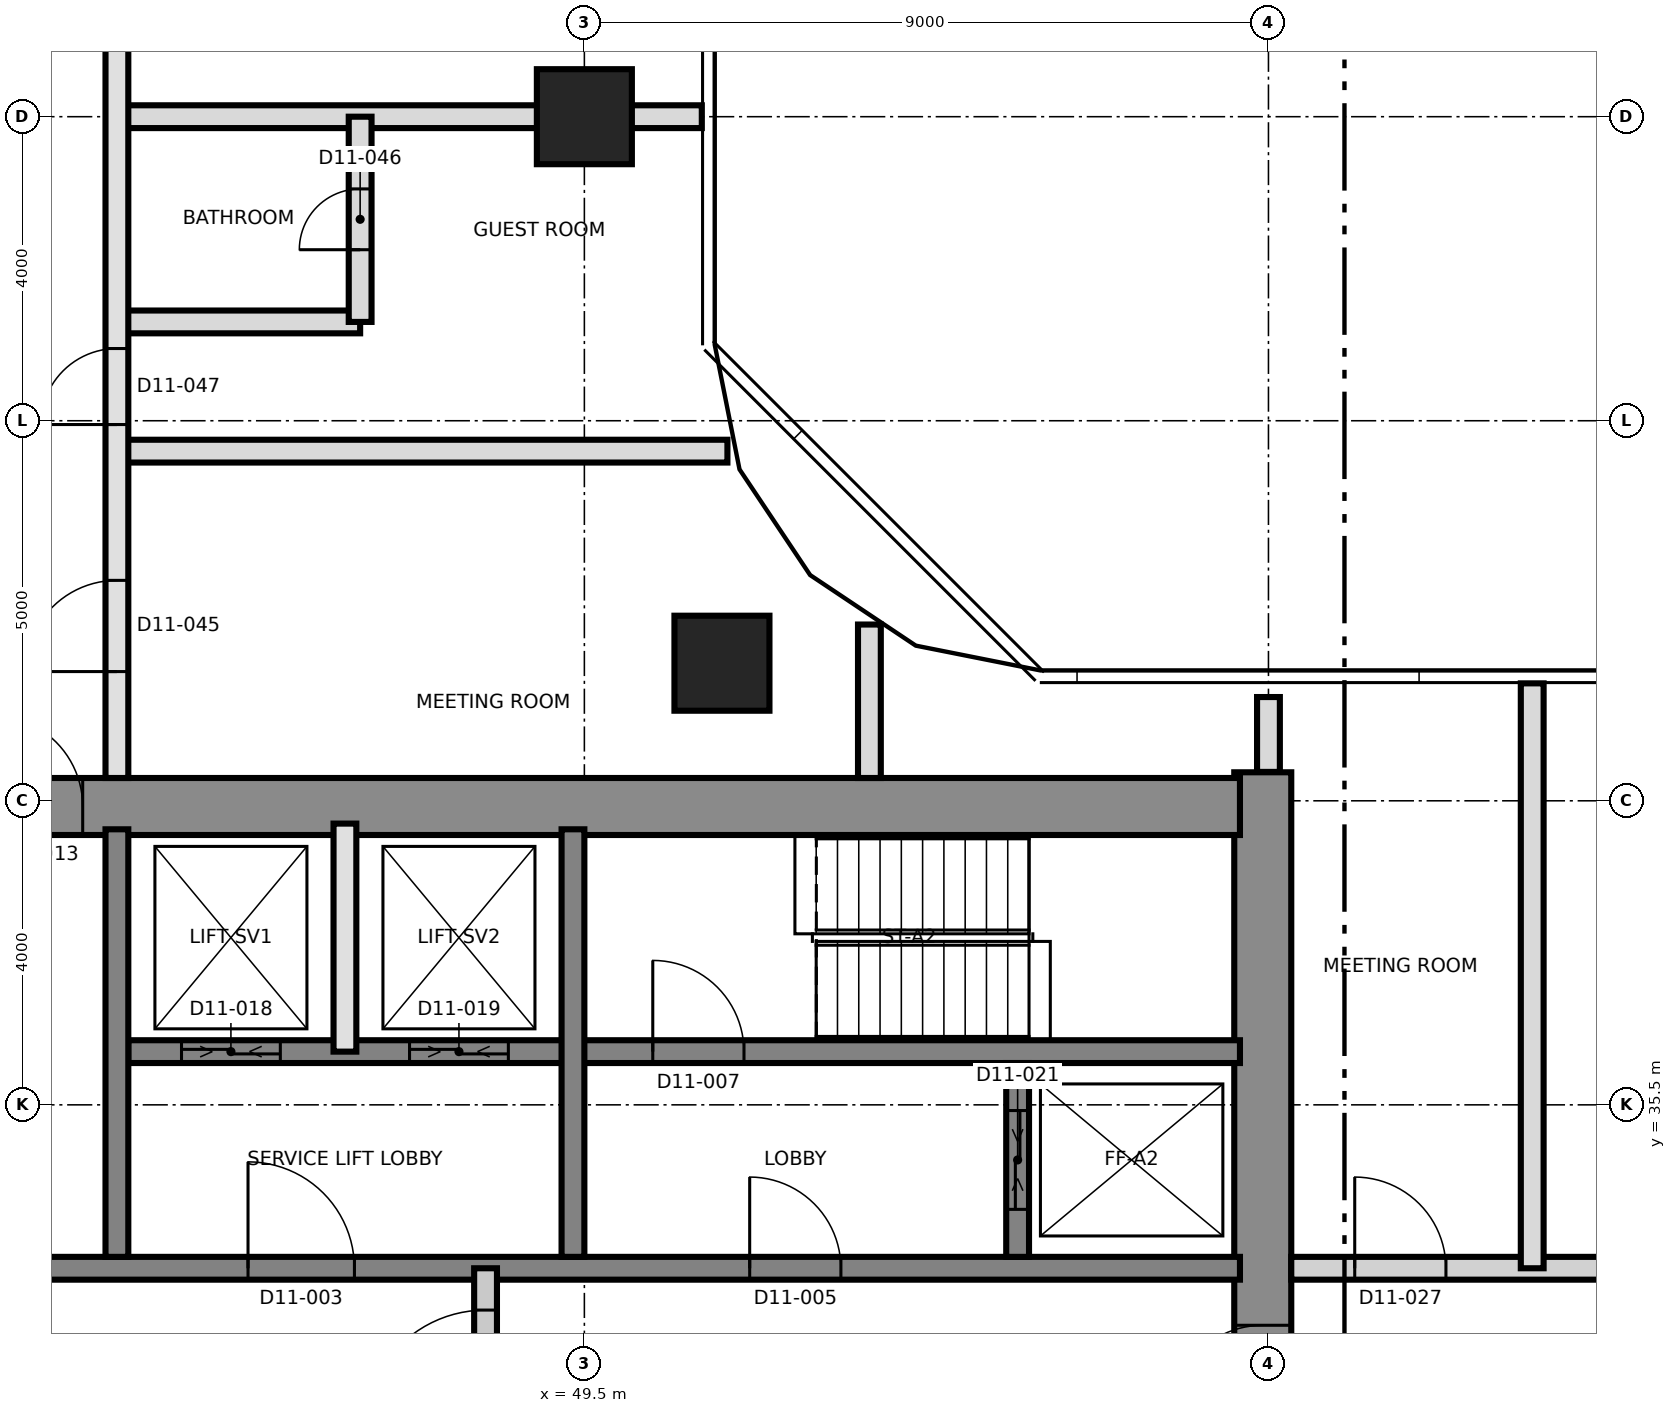
"""IFC4 building model, lengths in metres.
Left out: names, types, materials, properties, quantities, classifications, styles, units other than length and angle.
Written with IfcOpenShell. Run it as: python <this file> out.ifc"""

import sys

from ifc_helpers import new_model, si_unit, direction, frame, frame_2d, origin, origin_2d, place, context, subcontext, project, spatial, rectangle, extrude, element, fill, save


model = new_model("IFC4")
c1 = context("Model", 3, precision=1e-05, world=origin(), true_north=direction((0.0, 1.0)))
c2 = subcontext(c1, "Body", "Model", "MODEL_VIEW")
j1 = project(units=[si_unit("LENGTHUNIT", "METRE"), si_unit("PLANEANGLEUNIT", "RADIAN")], contexts=[c1])
p1 = place(None, origin())
s1 = spatial("IfcSite", under=j1, at=p1, CompositionType="ELEMENT")
p2 = place(p1, origin())
s2 = spatial("IfcBuilding", under=s1, at=p2, CompositionType="ELEMENT")
p3 = place(p2, frame((0.0, 0.0, 131.5)))
s3 = spatial("IfcBuildingStorey", under=s2, at=p3, CompositionType="ELEMENT", Elevation=131.5)
p4 = place(p3, frame((58.425, 21.125, 0.0), z_axis=(0.0, 0.0, 1.0), x_axis=(0.0, 1.0, 0.0)))
e1 = element("IfcWall", 1, at=p4, inside=s3, PredefinedType="SHEAR", context=c2, shape_type="SweptSolid", body=[
    extrude(rectangle(XDim=18.75, YDim=0.75, at=frame_2d((9.375, 0.0))), origin(), (0.0, 0.0, 1.0), 3.7),
])
p5 = place(p4, frame((10.275, 0.0, 0.0)))
e2 = element("IfcOpeningElement", 2, at=p5, cuts=e1, PredefinedType="OPENING", context=c2, shape_type="SweptSolid", body=[
    extrude(rectangle(XDim=1.2, YDim=2.1, at=frame_2d((0.6, 1.05))), frame((0.0, 0.385, 0.0), z_axis=(0.0, -1.0, 0.0), x_axis=(1.0, 0.0, 0.0)), (0.0, 0.0, 1.0), 0.77),
])
p6 = place(p3, frame((31.125, 39.425, 0.0), z_axis=(0.0, 0.0, 1.0), x_axis=(1.0, 0.0, 0.0)))
e3 = element("IfcWall", 3, at=p6, inside=s3, PredefinedType="SHEAR", context=c2, shape_type="SweptSolid", body=[
    extrude(rectangle(XDim=27.0, YDim=0.75, at=frame_2d((13.5, 0.0))), origin(), (0.0, 0.0, 1.0), 3.7),
])
p7 = place(p6, frame((10.575, 0.0, 0.0)))
e4 = element("IfcOpeningElement", 4, at=p7, cuts=e3, PredefinedType="OPENING", context=c2, shape_type="SweptSolid", body=[
    extrude(rectangle(XDim=1.2, YDim=2.1, at=frame_2d((0.6, 1.05))), frame((0.0, 0.385, 0.0), z_axis=(0.0, -1.0, 0.0), x_axis=(1.0, 0.0, 0.0)), (0.0, 0.0, 1.0), 0.77),
])
p8 = place(p3, frame((31.875, 33.35, 0.0), z_axis=(0.0, 0.0, 1.0), x_axis=(1.0, 0.0, 0.0)))
e5 = element("IfcWall", 5, at=p8, inside=s3, PredefinedType="SHEAR", context=c2, shape_type="SweptSolid", body=[
    extrude(rectangle(XDim=26.25, YDim=0.3, at=frame_2d((13.125, 0.0))), origin(), (0.0, 0.0, 1.0), 3.7),
])
p9 = place(p8, frame((13.2, 0.0, 0.0)))
e6 = element("IfcOpeningElement", 6, at=p9, cuts=e5, PredefinedType="OPENING", context=c2, shape_type="SweptSolid", body=[
    extrude(rectangle(XDim=1.4, YDim=2.1, at=frame_2d((0.7, 1.05))), frame((0.0, 0.16, 0.0), z_axis=(0.0, -1.0, 0.0), x_axis=(1.0, 0.0, 0.0)), (0.0, 0.0, 1.0), 0.32),
])
p10 = place(p8, frame((5.25, 0.0, 0.0)))
e7 = element("IfcOpeningElement", 7, at=p10, cuts=e5, PredefinedType="OPENING", context=c2, shape_type="SweptSolid", body=[
    extrude(rectangle(XDim=1.2, YDim=2.1, at=frame_2d((0.6, 1.05))), frame((0.0, 0.16, 0.0), z_axis=(0.0, -1.0, 0.0), x_axis=(1.0, 0.0, 0.0)), (0.0, 0.0, 1.0), 0.32),
])
p11 = place(p8, frame((19.8, 0.0, 0.0)))
e8 = element("IfcOpeningElement", 8, at=p11, cuts=e5, PredefinedType="OPENING", context=c2, shape_type="SweptSolid", body=[
    extrude(rectangle(XDim=1.2, YDim=2.1, at=frame_2d((0.6, 1.05))), frame((0.0, 0.16, 0.0), z_axis=(0.0, -1.0, 0.0), x_axis=(1.0, 0.0, 0.0)), (0.0, 0.0, 1.0), 0.32),
])
p12 = place(p3, frame((43.5, 36.2, 0.0), z_axis=(0.0, 0.0, 1.0), x_axis=(1.0, 0.0, 0.0)))
e9 = element("IfcWall", 9, at=p12, inside=s3, PredefinedType="SHEAR", context=c2, shape_type="SweptSolid", body=[
    extrude(rectangle(XDim=14.625, YDim=0.3, at=frame_2d((7.312, 0.0))), origin(), (0.0, 0.0, 1.0), 3.7),
])
p13 = place(p12, frame((6.9, 0.0, 0.0)))
e10 = element("IfcOpeningElement", 10, at=p13, cuts=e9, PredefinedType="OPENING", context=c2, shape_type="SweptSolid", body=[
    extrude(rectangle(XDim=1.2, YDim=2.1, at=frame_2d((0.6, 1.05))), frame((0.0, 0.16, 0.0), z_axis=(0.0, -1.0, 0.0), x_axis=(1.0, 0.0, 0.0)), (0.0, 0.0, 1.0), 0.32),
])
p14 = place(p12, frame((0.7, 0.0, 0.0)))
e11 = element("IfcOpeningElement", 11, at=p14, cuts=e9, PredefinedType="OPENING", context=c2, shape_type="SweptSolid", body=[
    extrude(rectangle(XDim=1.3, YDim=2.4, at=frame_2d((0.65, 1.2))), frame((0.0, 0.16, 0.0), z_axis=(0.0, -1.0, 0.0), x_axis=(1.0, 0.0, 0.0)), (0.0, 0.0, 1.0), 0.32),
])
p15 = place(p12, frame((3.7, 0.0, 0.0)))
e12 = element("IfcOpeningElement", 12, at=p15, cuts=e9, PredefinedType="OPENING", context=c2, shape_type="SweptSolid", body=[
    extrude(rectangle(XDim=1.3, YDim=2.4, at=frame_2d((0.65, 1.2))), frame((0.0, 0.16, 0.0), z_axis=(0.0, -1.0, 0.0), x_axis=(1.0, 0.0, 0.0)), (0.0, 0.0, 1.0), 0.32),
])
for number, where, z_axis, x_axis in (
    (13, (43.35, 33.5, 0.0), (0.0, 0.0, 1.0), (0.0, 1.0, 0.0)),
    (14, (49.35, 33.5, 0.0), (0.0, 0.0, 1.0), (0.0, 1.0, 0.0)),
):
    element("IfcWall", number, at=place(p3, frame(where, z_axis=z_axis, x_axis=x_axis)), inside=s3, PredefinedType="SHEAR", context=c2, shape_type="SweptSolid", body=[
        extrude(rectangle(XDim=5.625, YDim=0.3, at=frame_2d((2.812, 0.0))), origin(), (0.0, 0.0, 1.0), 3.7),
    ])
p16 = place(p3, frame((55.2, 33.5, 0.0), z_axis=(0.0, 0.0, 1.0), x_axis=(0.0, 1.0, 0.0)))
e15 = element("IfcWall", 15, at=p16, inside=s3, PredefinedType="SHEAR", context=c2, shape_type="SweptSolid", body=[
    extrude(rectangle(XDim=2.55, YDim=0.3, at=frame_2d((1.275, 0.0))), origin(), (0.0, 0.0, 1.0), 3.7),
])
p17 = place(p16, frame((0.625, 0.0, 0.0)))
e16 = element("IfcOpeningElement", 16, at=p17, cuts=e15, PredefinedType="OPENING", context=c2, shape_type="SweptSolid", body=[
    extrude(rectangle(XDim=1.3, YDim=2.4, at=frame_2d((0.65, 1.2))), frame((0.0, 0.16, 0.0), z_axis=(0.0, -1.0, 0.0), x_axis=(1.0, 0.0, 0.0)), (0.0, 0.0, 1.0), 0.32),
])
for number, where, z_axis, x_axis in (
    (17, (51.31, 41.31, 0.0), (0.0, 0.0, 1.0), (1.0, 0.0, 0.0)),
    (18, (49.5, 48.5, 0.0), (0.0, 0.0, 1.0), (1.0, 0.0, 0.0)),
):
    element("IfcColumn", number, at=place(p3, frame(where, z_axis=z_axis, x_axis=x_axis)), inside=s3, PredefinedType="COLUMN", context=c2, shape_type="SweptSolid", body=[
        extrude(rectangle(XDim=1.25, YDim=1.25, at=origin_2d()), origin(), (0.0, 0.0, 1.0), 3.7),
    ])
p18 = place(p3, frame((46.35, 36.2, 0.0), z_axis=(0.0, 0.0, 1.0), x_axis=(0.0, 1.0, 0.0)))
e19 = element("IfcWall", 19, at=p18, inside=s3, PredefinedType="SOLIDWALL", context=c2, shape_type="SweptSolid", body=[
    extrude(rectangle(XDim=3.0, YDim=0.3, at=frame_2d((1.5, 0.0))), origin(), (0.0, 0.0, 1.0), 3.4),
])
p19 = place(p3, frame((48.2, 24.9, 0.0), z_axis=(0.0, 0.0, 1.0), x_axis=(0.0, 1.0, 0.0)))
e20 = element("IfcWall", 20, at=p19, inside=s3, PredefinedType="PARTITIONING", context=c2, shape_type="SweptSolid", body=[
    extrude(rectangle(XDim=8.45, YDim=0.3, at=frame_2d((4.225, 0.0))), origin(), (0.0, 0.0, 1.0), 3.4),
])
p20 = place(p19, frame((6.3, 0.0, 0.0)))
e21 = element("IfcOpeningElement", 21, at=p20, cuts=e20, PredefinedType="OPENING", context=c2, shape_type="SweptSolid", body=[
    extrude(rectangle(XDim=1.6, YDim=2.1, at=frame_2d((0.8, 1.05))), frame((0.0, 0.16, 0.0), z_axis=(0.0, -1.0, 0.0), x_axis=(1.0, 0.0, 0.0)), (0.0, 0.0, 1.0), 0.32),
])
p21 = place(p3, frame((58.8, 33.35, 0.0), z_axis=(0.0, 0.0, 1.0), x_axis=(1.0, 0.0, 0.0)))
e22 = element("IfcWall", 22, at=p21, inside=s3, PredefinedType="PARTITIONING", context=c2, shape_type="SweptSolid", body=[
    extrude(rectangle(XDim=26.53, YDim=0.3, at=frame_2d((13.265, 0.0))), origin(), (0.0, 0.0, 1.0), 3.4),
])
p22 = place(p21, frame((0.835, 0.0, 0.0)))
e23 = element("IfcOpeningElement", 23, at=p22, cuts=e22, PredefinedType="OPENING", context=c2, shape_type="SweptSolid", body=[
    extrude(rectangle(XDim=1.2, YDim=2.1, at=frame_2d((0.6, 1.05))), frame((0.0, 0.16, 0.0), z_axis=(0.0, -1.0, 0.0), x_axis=(1.0, 0.0, 0.0)), (0.0, 0.0, 1.0), 0.32),
])
p23 = place(p21, frame((4.085, 0.0, 0.0)))
e24 = element("IfcOpeningElement", 24, at=p23, cuts=e22, PredefinedType="OPENING", context=c2, shape_type="SweptSolid", body=[
    extrude(rectangle(XDim=1.0, YDim=2.1, at=frame_2d((0.5, 1.05))), frame((0.0, 0.16, 0.0), z_axis=(0.0, -1.0, 0.0), x_axis=(1.0, 0.0, 0.0)), (0.0, 0.0, 1.0), 0.32),
])
p24 = place(p21, frame((12.7, 0.0, 0.0)))
e25 = element("IfcOpeningElement", 25, at=p24, cuts=e22, PredefinedType="OPENING", context=c2, shape_type="SweptSolid", body=[
    extrude(rectangle(XDim=1.0, YDim=2.4, at=frame_2d((0.5, 1.2))), frame((0.0, 0.16, 0.0), z_axis=(0.0, -1.0, 0.0), x_axis=(1.0, 0.0, 0.0)), (0.0, 0.0, 1.0), 0.32),
])
p25 = place(p21, frame((21.115, 0.0, 0.0)))
e26 = element("IfcOpeningElement", 26, at=p25, cuts=e22, PredefinedType="OPENING", context=c2, shape_type="SweptSolid", body=[
    extrude(rectangle(XDim=1.0, YDim=2.1, at=frame_2d((0.5, 1.05))), frame((0.0, 0.16, 0.0), z_axis=(0.0, -1.0, 0.0), x_axis=(1.0, 0.0, 0.0)), (0.0, 0.0, 1.0), 0.32),
])
p26 = place(p21, frame((24.065, 0.0, 0.0)))
e27 = element("IfcOpeningElement", 27, at=p26, cuts=e22, PredefinedType="OPENING", context=c2, shape_type="SweptSolid", body=[
    extrude(rectangle(XDim=1.4, YDim=2.1, at=frame_2d((0.7, 1.05))), frame((0.0, 0.16, 0.0), z_axis=(0.0, -1.0, 0.0), x_axis=(1.0, 0.0, 0.0)), (0.0, 0.0, 1.0), 0.32),
])
p27 = place(p3, frame((43.35, 44.1, 0.0), z_axis=(0.0, 0.0, 1.0), x_axis=(1.0, 0.0, 0.0)))
e28 = element("IfcWall", 28, at=p27, inside=s3, PredefinedType="PARTITIONING", context=c2, shape_type="SweptSolid", body=[
    extrude(rectangle(XDim=8.032, YDim=0.3, at=frame_2d((4.016, 0.0))), origin(), (0.0, 0.0, 1.0), 3.35),
])
p28 = place(p3, frame((43.35, 45.8, 0.0), z_axis=(0.0, 0.0, 1.0), x_axis=(1.0, 0.0, 0.0)))
e29 = element("IfcWall", 29, at=p28, inside=s3, PredefinedType="PARTITIONING", context=c2, shape_type="SweptSolid", body=[
    extrude(rectangle(XDim=3.2, YDim=0.3, at=frame_2d((1.6, 0.0))), origin(), (0.0, 0.0, 1.0), 3.4),
])
p29 = place(p3, frame((43.35, 48.5, 0.0), z_axis=(0.0, 0.0, 1.0), x_axis=(1.0, 0.0, 0.0)))
e30 = element("IfcWall", 30, at=p29, inside=s3, PredefinedType="PARTITIONING", context=c2, shape_type="SweptSolid", body=[
    extrude(rectangle(XDim=7.695, YDim=0.3, at=frame_2d((3.847, 0.0))), origin(), (0.0, 0.0, 1.0), 3.35),
])
p30 = place(p3, frame((43.35, 39.8, 0.0), z_axis=(0.0, 0.0, 1.0), x_axis=(0.0, 1.0, 0.0)))
e31 = element("IfcWall", 31, at=p30, inside=s3, PredefinedType="SOLIDWALL", context=c2, shape_type="SweptSolid", body=[
    extrude(rectangle(XDim=26.0, YDim=0.3, at=frame_2d((13.0, 0.0))), origin(), (0.0, 0.0, 1.0), 3.4),
])
p31 = place(p30, frame((1.4, 0.0, 0.0)))
e32 = element("IfcOpeningElement", 32, at=p31, cuts=e31, PredefinedType="OPENING", context=c2, shape_type="SweptSolid", body=[
    extrude(rectangle(XDim=1.2, YDim=2.1, at=frame_2d((0.6, 1.05))), frame((0.0, 0.16, 0.0), z_axis=(0.0, -1.0, 0.0), x_axis=(1.0, 0.0, 0.0)), (0.0, 0.0, 1.0), 0.32),
])
p32 = place(p30, frame((4.65, 0.0, 0.0)))
e33 = element("IfcOpeningElement", 33, at=p32, cuts=e31, PredefinedType="OPENING", context=c2, shape_type="SweptSolid", body=[
    extrude(rectangle(XDim=1.0, YDim=2.1, at=frame_2d((0.5, 1.05))), frame((0.0, 0.16, 0.0), z_axis=(0.0, -1.0, 0.0), x_axis=(1.0, 0.0, 0.0)), (0.0, 0.0, 1.0), 0.32),
])
p33 = place(p30, frame((9.835, 0.0, 0.0)))
e34 = element("IfcOpeningElement", 34, at=p33, cuts=e31, PredefinedType="OPENING", context=c2, shape_type="SweptSolid", body=[
    extrude(rectangle(XDim=1.2, YDim=2.1, at=frame_2d((0.6, 1.05))), frame((0.0, 0.16, 0.0), z_axis=(0.0, -1.0, 0.0), x_axis=(1.0, 0.0, 0.0)), (0.0, 0.0, 1.0), 0.32),
])
p34 = place(p30, frame((13.085, 0.0, 0.0)))
e35 = element("IfcOpeningElement", 35, at=p34, cuts=e31, PredefinedType="OPENING", context=c2, shape_type="SweptSolid", body=[
    extrude(rectangle(XDim=1.0, YDim=2.1, at=frame_2d((0.5, 1.05))), frame((0.0, 0.16, 0.0), z_axis=(0.0, -1.0, 0.0), x_axis=(1.0, 0.0, 0.0)), (0.0, 0.0, 1.0), 0.32),
])
p35 = place(p30, frame((21.25, 0.0, 0.0)))
e36 = element("IfcOpeningElement", 36, at=p35, cuts=e31, PredefinedType="OPENING", context=c2, shape_type="SweptSolid", body=[
    extrude(rectangle(XDim=1.0, YDim=2.4, at=frame_2d((0.5, 1.2))), frame((0.0, 0.16, 0.0), z_axis=(0.0, -1.0, 0.0), x_axis=(1.0, 0.0, 0.0)), (0.0, 0.0, 1.0), 0.32),
])
p36 = place(p3, frame((46.55, 45.8, 0.0), z_axis=(0.0, 0.0, 1.0), x_axis=(0.0, 1.0, 0.0)))
e37 = element("IfcWall", 37, at=p36, inside=s3, PredefinedType="PARTITIONING", context=c2, shape_type="SweptSolid", body=[
    extrude(rectangle(XDim=2.7, YDim=0.3, at=frame_2d((1.35, 0.0))), origin(), (0.0, 0.0, 1.0), 3.4),
])
p37 = place(p36, frame((0.95, 0.0, 0.0)))
e38 = element("IfcOpeningElement", 38, at=p37, cuts=e37, PredefinedType="OPENING", context=c2, shape_type="SweptSolid", body=[
    extrude(rectangle(XDim=0.8, YDim=2.1, at=frame_2d((0.4, 1.05))), frame((0.0, 0.16, 0.0), z_axis=(0.0, -1.0, 0.0), x_axis=(1.0, 0.0, 0.0)), (0.0, 0.0, 1.0), 0.32),
])
p38 = place(p3, frame((53.25, 39.8, 0.0), z_axis=(0.0, 0.0, 1.0), x_axis=(0.0, 1.0, 0.0)))
e39 = element("IfcWall", 39, at=p38, inside=s3, PredefinedType="PARTITIONING", context=c2, shape_type="SweptSolid", body=[
    extrude(rectangle(XDim=2.019, YDim=0.3, at=frame_2d((1.01, 0.0))), origin(), (0.0, 0.0, 1.0), 3.35),
])
p39 = place(p3, frame((58.5, 39.88, 0.0), z_axis=(0.0, 0.0, 1.0), x_axis=(0.0, 1.0, 0.0)))
e40 = element("IfcWall", 40, at=p39, inside=s3, PredefinedType="PARTITIONING", context=c2, shape_type="SweptSolid", body=[
    extrude(rectangle(XDim=0.985, YDim=0.3, at=frame_2d((0.493, 0.0))), origin(), (0.0, 0.0, 1.0), 3.35),
])
p40 = place(p3, frame((61.97, 33.35, 0.0), z_axis=(0.0, 0.0, 1.0), x_axis=(0.0, 1.0, 0.0)))
e41 = element("IfcWall", 41, at=p40, inside=s3, PredefinedType="PARTITIONING", context=c2, shape_type="SweptSolid", body=[
    extrude(rectangle(XDim=7.695, YDim=0.3, at=frame_2d((3.847, 0.0))), origin(), (0.0, 0.0, 1.0), 3.35),
])
p41 = place(p20, origin())
e42 = element("IfcDoor", 42, at=p41, inside=s3, OperationType="SINGLE_SWING_LEFT", PredefinedType="DOOR", context=c2, shape_type="SweptSolid", body=[
    extrude(rectangle(XDim=1.6, YDim=2.1, at=frame_2d((0.8, 1.05))), frame((0.0, 0.025, 0.0), z_axis=(0.0, -1.0, 0.0), x_axis=(1.0, 0.0, 0.0)), (0.0, 0.0, 1.0), 0.05),
])
fill(e21, e42)
p42 = place(p9, origin())
e43 = element("IfcDoor", 43, at=p42, inside=s3, OperationType="SINGLE_SWING_RIGHT", PredefinedType="DOOR", context=c2, shape_type="SweptSolid", body=[
    extrude(rectangle(XDim=1.4, YDim=2.1, at=frame_2d((0.7, 1.05))), frame((0.0, 0.025, 0.0), z_axis=(0.0, -1.0, 0.0), x_axis=(1.0, 0.0, 0.0)), (0.0, 0.0, 1.0), 0.05),
])
fill(e6, e43)
p43 = place(p11, origin())
e44 = element("IfcDoor", 44, at=p43, inside=s3, OperationType="SINGLE_SWING_RIGHT", PredefinedType="DOOR", context=c2, shape_type="SweptSolid", body=[
    extrude(rectangle(XDim=1.2, YDim=2.1, at=frame_2d((0.6, 1.05))), frame((0.0, 0.025, 0.0), z_axis=(0.0, -1.0, 0.0), x_axis=(1.0, 0.0, 0.0)), (0.0, 0.0, 1.0), 0.05),
])
fill(e8, e44)
p44 = place(p13, origin())
e45 = element("IfcDoor", 45, at=p44, inside=s3, OperationType="SINGLE_SWING_LEFT", PredefinedType="DOOR", context=c2, shape_type="SweptSolid", body=[
    extrude(rectangle(XDim=1.2, YDim=2.1, at=frame_2d((0.6, 1.05))), frame((0.0, 0.025, 0.0), z_axis=(0.0, -1.0, 0.0), x_axis=(1.0, 0.0, 0.0)), (0.0, 0.0, 1.0), 0.05),
])
fill(e10, e45)
p45 = place(p5, origin())
e46 = element("IfcDoor", 46, at=p45, inside=s3, OperationType="SINGLE_SWING_LEFT", PredefinedType="DOOR", context=c2, shape_type="SweptSolid", body=[
    extrude(rectangle(XDim=1.2, YDim=2.1, at=frame_2d((0.6, 1.05))), frame((0.0, 0.025, 0.0), z_axis=(0.0, -1.0, 0.0), x_axis=(1.0, 0.0, 0.0)), (0.0, 0.0, 1.0), 0.05),
])
fill(e2, e46)
p46 = place(p7, origin())
e47 = element("IfcDoor", 47, at=p46, inside=s3, OperationType="SINGLE_SWING_RIGHT", PredefinedType="DOOR", context=c2, shape_type="SweptSolid", body=[
    extrude(rectangle(XDim=1.2, YDim=2.1, at=frame_2d((0.6, 1.05))), frame((0.0, 0.025, 0.0), z_axis=(0.0, -1.0, 0.0), x_axis=(1.0, 0.0, 0.0)), (0.0, 0.0, 1.0), 0.05),
])
fill(e4, e47)
p47 = place(p14, origin())
e48 = element("IfcDoor", 48, at=p47, inside=s3, OperationType="SLIDING_TO_LEFT", PredefinedType="DOOR", context=c2, shape_type="SweptSolid", body=[
    extrude(rectangle(XDim=1.3, YDim=2.4, at=frame_2d((0.65, 1.2))), frame((0.0, 0.025, 0.0), z_axis=(0.0, -1.0, 0.0), x_axis=(1.0, 0.0, 0.0)), (0.0, 0.0, 1.0), 0.05),
])
fill(e11, e48)
p48 = place(p15, origin())
e49 = element("IfcDoor", 49, at=p48, inside=s3, OperationType="SLIDING_TO_LEFT", PredefinedType="DOOR", context=c2, shape_type="SweptSolid", body=[
    extrude(rectangle(XDim=1.3, YDim=2.4, at=frame_2d((0.65, 1.2))), frame((0.0, 0.025, 0.0), z_axis=(0.0, -1.0, 0.0), x_axis=(1.0, 0.0, 0.0)), (0.0, 0.0, 1.0), 0.05),
])
fill(e12, e49)
p49 = place(p17, origin())
e50 = element("IfcDoor", 50, at=p49, inside=s3, OperationType="SLIDING_TO_LEFT", PredefinedType="DOOR", context=c2, shape_type="SweptSolid", body=[
    extrude(rectangle(XDim=1.3, YDim=2.4, at=frame_2d((0.65, 1.2))), frame((0.0, 0.025, 0.0), z_axis=(0.0, -1.0, 0.0), x_axis=(1.0, 0.0, 0.0)), (0.0, 0.0, 1.0), 0.05),
])
fill(e16, e50)
p50 = place(p22, origin())
e51 = element("IfcDoor", 51, at=p50, inside=s3, OperationType="SINGLE_SWING_LEFT", PredefinedType="DOOR", context=c2, shape_type="SweptSolid", body=[
    extrude(rectangle(XDim=1.2, YDim=2.1, at=frame_2d((0.6, 1.05))), frame((0.0, 0.025, 0.0), z_axis=(0.0, -1.0, 0.0), x_axis=(1.0, 0.0, 0.0)), (0.0, 0.0, 1.0), 0.05),
])
fill(e23, e51)
p51 = place(p31, origin())
e52 = element("IfcDoor", 52, at=p51, inside=s3, OperationType="SINGLE_SWING_LEFT", PredefinedType="DOOR", context=c2, shape_type="SweptSolid", body=[
    extrude(rectangle(XDim=1.2, YDim=2.1, at=frame_2d((0.6, 1.05))), frame((0.0, 0.025, 0.0), z_axis=(0.0, -1.0, 0.0), x_axis=(1.0, 0.0, 0.0)), (0.0, 0.0, 1.0), 0.05),
])
fill(e32, e52)
p52 = place(p37, origin())
e53 = element("IfcDoor", 53, at=p52, inside=s3, OperationType="SINGLE_SWING_RIGHT", PredefinedType="DOOR", context=c2, shape_type="SweptSolid", body=[
    extrude(rectangle(XDim=0.8, YDim=2.1, at=frame_2d((0.4, 1.05))), frame((0.0, 0.025, 0.0), z_axis=(0.0, -1.0, 0.0), x_axis=(1.0, 0.0, 0.0)), (0.0, 0.0, 1.0), 0.05),
])
fill(e38, e53)
p53 = place(p32, origin())
e54 = element("IfcDoor", 54, at=p53, inside=s3, OperationType="SINGLE_SWING_LEFT", PredefinedType="DOOR", context=c2, shape_type="SweptSolid", body=[
    extrude(rectangle(XDim=1.0, YDim=2.1, at=frame_2d((0.5, 1.05))), frame((0.0, 0.025, 0.0), z_axis=(0.0, -1.0, 0.0), x_axis=(1.0, 0.0, 0.0)), (0.0, 0.0, 1.0), 0.05),
])
fill(e33, e54)
save(model, sys.argv[1])
